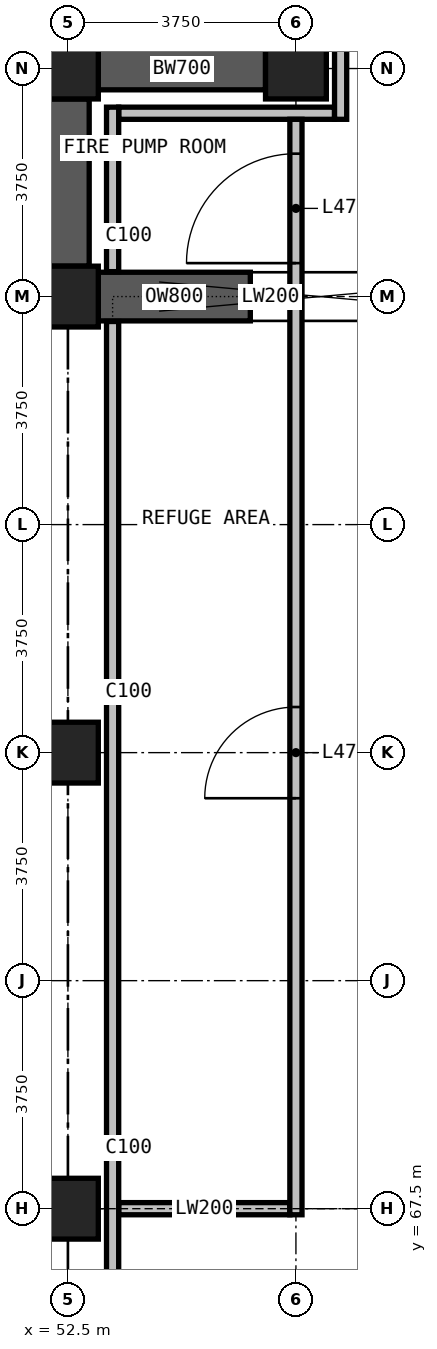
"""IFC4 building model, lengths in metres.
Left out: names, types, materials, properties, quantities, classifications, styles, units other than length and angle.
Written with IfcOpenShell. Run it as: python <this file> out.ifc"""

import sys

from ifc_helpers import new_model, si_unit, direction, frame, frame_2d, origin, origin_2d, place, context, subcontext, project, spatial, rectangle, extrude, element, fill, save


model = new_model("IFC4")
c1 = context("Model", 3, precision=1e-05, world=origin(), true_north=direction((0.0, 1.0)))
c2 = subcontext(c1, "Body", "Model", "MODEL_VIEW")
j1 = project(units=[si_unit("LENGTHUNIT", "METRE"), si_unit("PLANEANGLEUNIT", "RADIAN")], contexts=[c1])
p1 = place(None, origin())
s1 = spatial("IfcSite", under=j1, at=p1, CompositionType="ELEMENT")
p2 = place(p1, origin())
s2 = spatial("IfcBuilding", under=s1, at=p2, CompositionType="ELEMENT")
p3 = place(p2, frame((0.0, 0.0, 183.7)))
s3 = spatial("IfcBuildingStorey", under=s2, at=p3, CompositionType="ELEMENT", Elevation=183.7)
for number, where, z_axis, x_axis in (
    (1, (52.5, 67.5, 0.0), (0.0, 0.0, 1.0), (1.0, 0.0, 0.0)),
    (2, (52.5, 75.0, 0.0), (0.0, 0.0, 1.0), (1.0, 0.0, 0.0)),
    (3, (52.5, 82.5, 0.0), (0.0, 0.0, 1.0), (1.0, 0.0, 0.0)),
    (4, (52.5, 86.25, 0.0), (0.0, 0.0, 1.0), (1.0, 0.0, 0.0)),
    (5, (56.25, 86.25, 0.0), (0.0, 0.0, 1.0), (1.0, 0.0, 0.0)),
):
    element("IfcColumn", number, at=place(p3, frame(where, z_axis=z_axis, x_axis=x_axis)), inside=s3, PredefinedType="COLUMN", context=c2, shape_type="SweptSolid", body=[
        extrude(rectangle(XDim=1.0, YDim=1.0, at=origin_2d()), origin(), (0.0, 0.0, 1.0), 5.0),
    ])
for number, where, z_axis, x_axis in (
    (6, (52.5, 83.0, 0.0), (0.0, 0.0, 1.0), (0.0, 1.0, 0.0)),
    (7, (53.0, 86.25, 0.0), (0.0, 0.0, 1.0), (1.0, 0.0, 0.0)),
):
    element("IfcWall", number, at=place(p3, frame(where, z_axis=z_axis, x_axis=x_axis)), inside=s3, PredefinedType="SHEAR", context=c2, shape_type="SweptSolid", body=[
        extrude(rectangle(XDim=2.75, YDim=0.7, at=frame_2d((1.375, 0.0))), origin(), (0.0, 0.0, 1.0), 4.7),
    ])
p4 = place(p3, frame((53.0, 82.5, 0.0), z_axis=(0.0, 0.0, 1.0), x_axis=(1.0, 0.0, 0.0)))
e8 = element("IfcWall", 8, at=p4, inside=s3, PredefinedType="SHEAR", context=c2, shape_type="SweptSolid", body=[
    extrude(rectangle(XDim=2.5, YDim=0.8, at=frame_2d((1.25, 0.0))), origin(), (0.0, 0.0, 1.0), 4.7),
])
p5 = place(p3, frame((53.335, 67.5, 0.0), z_axis=(0.0, 0.0, 1.0), x_axis=(1.0, 0.0, 0.0)))
e9 = element("IfcWall", 9, at=p5, inside=s3, PredefinedType="PARTITIONING", context=c2, shape_type="SweptSolid", body=[
    extrude(rectangle(XDim=2.815, YDim=0.2, at=frame_2d((1.407, 0.0))), origin(), (0.0, 0.0, 1.0), 2.9),
])
p6 = place(p3, frame((55.51, 82.5, 0.0), z_axis=(0.0, 0.0, 1.0), x_axis=(1.0, 0.0, 0.0)))
e10 = element("IfcWall", 10, at=p6, inside=s3, PredefinedType="PARTITIONING", context=c2, shape_type="SweptSolid", body=[
    extrude(rectangle(XDim=0.64, YDim=0.2, at=frame_2d((0.32, 0.0))), origin(), (0.0, 0.0, 1.0), 2.4),
])
p7 = place(p3, frame((53.335, 85.515, 0.0), z_axis=(0.0, 0.0, 1.0), x_axis=(1.0, 0.0, 0.0)))
e11 = element("IfcWall", 11, at=p7, inside=s3, PredefinedType="PARTITIONING", context=c2, shape_type="SweptSolid", body=[
    extrude(rectangle(XDim=3.55, YDim=0.2, at=frame_2d((1.775, 0.0))), origin(), (0.0, 0.0, 1.0), 4.7),
])
p8 = place(p3, frame((53.235, 53.135, 0.0), z_axis=(0.0, 0.0, 1.0), x_axis=(0.0, 1.0, 0.0)))
e12 = element("IfcWall", 12, at=p8, inside=s3, PredefinedType="PARTITIONING", context=c2, shape_type="SweptSolid", body=[
    extrude(rectangle(XDim=28.955, YDim=0.2, at=frame_2d((14.478, 0.0))), origin(), (0.0, 0.0, 1.0), 4.7),
])
p9 = place(p3, frame((53.235, 82.91, 0.0), z_axis=(0.0, 0.0, 1.0), x_axis=(0.0, 1.0, 0.0)))
e13 = element("IfcWall", 13, at=p9, inside=s3, PredefinedType="PARTITIONING", context=c2, shape_type="SweptSolid", body=[
    extrude(rectangle(XDim=2.705, YDim=0.2, at=frame_2d((1.353, 0.0))), origin(), (0.0, 0.0, 1.0), 4.7),
])
p10 = place(p3, frame((56.25, 67.4, 0.0), z_axis=(0.0, 0.0, 1.0), x_axis=(0.0, 1.0, 0.0)))
e14 = element("IfcWall", 14, at=p10, inside=s3, PredefinedType="PARTITIONING", context=c2, shape_type="SweptSolid", body=[
    extrude(rectangle(XDim=18.015, YDim=0.2, at=frame_2d((9.008, 0.0))), origin(), (0.0, 0.0, 1.0), 4.7),
])
p11 = place(p10, frame((6.85, 0.0, 0.0)))
e15 = element("IfcOpeningElement", 15, at=p11, cuts=e14, PredefinedType="OPENING", context=c2, shape_type="SweptSolid", body=[
    extrude(rectangle(XDim=1.5, YDim=2.2, at=frame_2d((0.75, 1.1))), frame((0.0, 0.11, 0.0), z_axis=(0.0, -1.0, 0.0), x_axis=(1.0, 0.0, 0.0)), (0.0, 0.0, 1.0), 0.22),
])
p12 = place(p10, frame((15.65, 0.0, 0.0)))
e16 = element("IfcOpeningElement", 16, at=p12, cuts=e14, PredefinedType="OPENING", context=c2, shape_type="SweptSolid", body=[
    extrude(rectangle(XDim=1.8, YDim=2.4, at=frame_2d((0.9, 1.2))), frame((0.0, 0.11, 0.0), z_axis=(0.0, -1.0, 0.0), x_axis=(1.0, 0.0, 0.0)), (0.0, 0.0, 1.0), 0.22),
])
p13 = place(p3, frame((56.985, 85.415, 0.0), z_axis=(0.0, 0.0, 1.0), x_axis=(0.0, 1.0, 0.0)))
e17 = element("IfcWall", 17, at=p13, inside=s3, PredefinedType="PARTITIONING", context=c2, shape_type="SweptSolid", body=[
    extrude(rectangle(XDim=3.95, YDim=0.2, at=frame_2d((1.975, 0.0))), origin(), (0.0, 0.0, 1.0), 4.7),
])
p14 = place(p11, origin())
e18 = element("IfcDoor", 18, at=p14, inside=s3, OperationType="DOUBLE_DOOR_SINGLE_SWING", PredefinedType="DOOR", context=c2, shape_type="SweptSolid", body=[
    extrude(rectangle(XDim=1.5, YDim=2.2, at=frame_2d((0.75, 1.1))), frame((0.0, 0.025, 0.0), z_axis=(0.0, -1.0, 0.0), x_axis=(1.0, 0.0, 0.0)), (0.0, 0.0, 1.0), 0.05),
])
fill(e15, e18)
p15 = place(p12, origin())
e19 = element("IfcDoor", 19, at=p15, inside=s3, OperationType="DOUBLE_DOOR_SINGLE_SWING", PredefinedType="DOOR", context=c2, shape_type="SweptSolid", body=[
    extrude(rectangle(XDim=1.8, YDim=2.4, at=frame_2d((0.9, 1.2))), frame((0.0, 0.025, 0.0), z_axis=(0.0, -1.0, 0.0), x_axis=(1.0, 0.0, 0.0)), (0.0, 0.0, 1.0), 0.05),
])
fill(e16, e19)
save(model, sys.argv[1])
